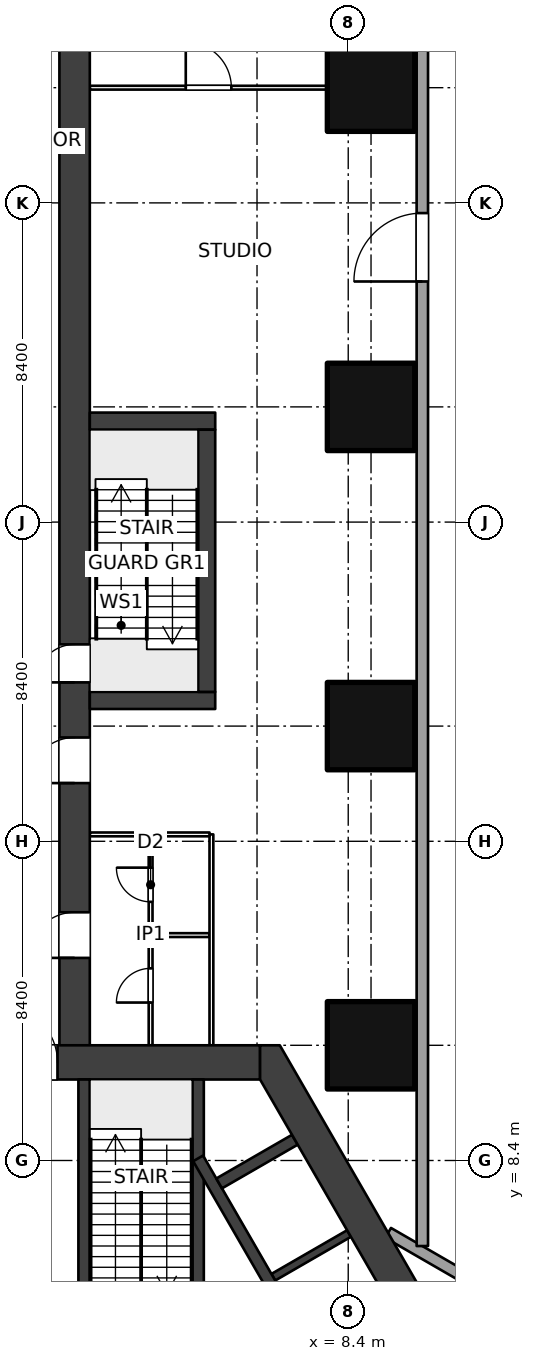
"""IFC4 building model, lengths in metres.
Left out: names, types, materials, properties, quantities, classifications, styles, units other than length and angle.
Written with IfcOpenShell. Run it as: python <this file> out.ifc"""

import sys

from ifc_helpers import new_model, si_unit, direction, frame, frame_2d, origin, origin_2d, place, context, subcontext, project, spatial, polyline, rectangle, outline, extrude, element, fill, save


model = new_model("IFC4")
c1 = context("Model", 3, precision=1e-05, world=origin(), true_north=direction((0.0, 1.0)))
c2 = subcontext(c1, "Body", "Model", "MODEL_VIEW")
j1 = project(units=[si_unit("LENGTHUNIT", "METRE"), si_unit("PLANEANGLEUNIT", "RADIAN")], contexts=[c1])
p1 = place(None, origin())
s1 = spatial("IfcSite", under=j1, at=p1, CompositionType="ELEMENT")
p2 = place(p1, origin())
s2 = spatial("IfcBuilding", under=s1, at=p2, CompositionType="ELEMENT")
p3 = place(p2, frame((0.0, 0.0, 6.0)))
s3 = spatial("IfcBuildingStorey", under=s2, at=p3, CompositionType="ELEMENT", Elevation=6.0)
for number, where, z_axis, x_axis in (
    (1, (9.0, 11.432, 0.0), (0.0, 0.0, 1.0), (1.0, 0.0, 0.0)),
    (2, (9.0, 19.832, 0.0), (0.0, 0.0, 1.0), (1.0, 0.0, 0.0)),
    (3, (9.0, 28.231, 0.0), (0.0, 0.0, 1.0), (1.0, 0.0, 0.0)),
    (4, (9.0, 36.632, 0.0), (0.0, 0.0, 1.0), (1.0, 0.0, 0.0)),
):
    element("IfcColumn", number, at=place(p3, frame(where, z_axis=z_axis, x_axis=x_axis)), inside=s3, PredefinedType="COLUMN", context=c2, shape_type="SweptSolid", body=[
        extrude(rectangle(XDim=2.3, YDim=2.3, at=origin_2d()), origin(), (0.0, 0.0, 1.0), 5.0),
    ])
p4 = place(p3, frame((-6.08, 10.981, 0.0), z_axis=(0.0, 0.0, 1.0), x_axis=(1.0, 0.0, 0.0)))
e5 = element("IfcWall", 5, at=p4, inside=s3, PredefinedType="SHEAR", context=c2, shape_type="SweptSolid", body=[
    extrude(rectangle(XDim=12.161, YDim=0.9, at=frame_2d((6.08, 0.0))), origin(), (0.0, 0.0, 1.0), 5.0),
])
p5 = place(p4, frame((5.33, 0.0, 0.0)))
e6 = element("IfcOpeningElement", 6, at=p5, cuts=e5, PredefinedType="OPENING", context=c2, shape_type="SweptSolid", body=[
    extrude(rectangle(XDim=1.5, YDim=2.1, at=frame_2d((0.75, 1.05))), frame((0.0, 0.46, 0.0), z_axis=(0.0, -1.0, 0.0), x_axis=(1.0, 0.0, 0.0)), (0.0, 0.0, 1.0), 0.92),
])
p6 = place(p3, origin())
e7 = element("IfcWall", 7, at=p6, inside=s3, PredefinedType="SHEAR", context=c2, shape_type="SweptSolid", body=[
    extrude(outline(polyline([(13.2, 0.0), (6.6, 11.432), (6.08, 11.432), (6.08, 10.531), (12.161, 0.0), (12.94, -0.45), (13.2, 0.0)])), origin(), (0.0, 0.0, 1.0), 5.0),
])
p7 = place(p3, frame((1.45, 3.63, 0.0), z_axis=(0.0, 0.0, 1.0), x_axis=(0.0, 1.0, 0.0)))
e8 = element("IfcWall", 8, at=p7, inside=s3, PredefinedType="SHEAR", context=c2, shape_type="SweptSolid", body=[
    extrude(rectangle(XDim=6.902, YDim=0.3, at=frame_2d((3.451, 0.0))), origin(), (0.0, 0.0, 1.0), 5.0),
])
p8 = place(p7, frame((0.25, 0.0, 0.0)))
e9 = element("IfcOpeningElement", 9, at=p8, cuts=e8, PredefinedType="OPENING", context=c2, shape_type="SweptSolid", body=[
    extrude(rectangle(XDim=1.0, YDim=2.1, at=frame_2d((0.5, 1.05))), frame((0.0, 0.16, 0.0), z_axis=(0.0, -1.0, 0.0), x_axis=(1.0, 0.0, 0.0)), (0.0, 0.0, 1.0), 0.32),
])
p9 = place(p3, frame((4.45, 3.63, 0.0), z_axis=(0.0, 0.0, 1.0), x_axis=(0.0, 1.0, 0.0)))
e10 = element("IfcWall", 10, at=p9, inside=s3, PredefinedType="SHEAR", context=c2, shape_type="SweptSolid", body=[
    extrude(rectangle(XDim=6.902, YDim=0.3, at=frame_2d((3.451, 0.0))), origin(), (0.0, 0.0, 1.0), 5.0),
])
p10 = place(p3, frame((4.45, 8.455, 0.0), z_axis=(0.0, 0.0, 1.0), x_axis=(0.500002290144, -0.866024081565, 0.0)))
e11 = element("IfcWall", 11, at=p10, inside=s3, PredefinedType="SHEAR", context=c2, shape_type="SweptSolid", body=[
    extrude(rectangle(XDim=10.195, YDim=0.3, at=frame_2d((5.098, 0.0))), origin(), (0.0, 0.0, 1.0), 5.0),
])
p11 = place(p3, frame((5.004, 7.796, 0.0), z_axis=(0.0, 0.0, 1.0), x_axis=(0.866053019151, 0.499952165731, 0.0)))
e12 = element("IfcWall", 12, at=p11, inside=s3, PredefinedType="SHEAR", context=c2, shape_type="SweptSolid", body=[
    extrude(rectangle(XDim=2.3, YDim=0.3, at=frame_2d((1.15, 0.0))), origin(), (0.0, 0.0, 1.0), 5.0),
])
p12 = place(p3, frame((6.429, 5.328, 0.0), z_axis=(0.0, 0.0, 1.0), x_axis=(0.866007057882, 0.500031774688, 0.0)))
e13 = element("IfcWall", 13, at=p12, inside=s3, PredefinedType="SHEAR", context=c2, shape_type="SweptSolid", body=[
    extrude(rectangle(XDim=2.3, YDim=0.2, at=frame_2d((1.15, 0.0))), origin(), (0.0, 0.0, 1.0), 5.0),
])
p13 = place(p3, frame((1.2, 10.981, 0.0), z_axis=(0.0, 0.0, 1.0), x_axis=(0.0, 1.0, 0.0)))
e14 = element("IfcWall", 14, at=p13, inside=s3, PredefinedType="SHEAR", context=c2, shape_type="SweptSolid", body=[
    extrude(rectangle(XDim=36.75, YDim=0.8, at=frame_2d((18.375, 0.0))), origin(), (0.0, 0.0, 1.0), 5.0),
])
p14 = place(p13, frame((10.0, 0.0, 0.0)))
e15 = element("IfcOpeningElement", 15, at=p14, cuts=e14, PredefinedType="OPENING", context=c2, shape_type="SweptSolid", body=[
    extrude(rectangle(XDim=1.0, YDim=2.1, at=frame_2d((0.5, 1.05))), frame((0.0, 0.41, 0.0), z_axis=(0.0, -1.0, 0.0), x_axis=(1.0, 0.0, 0.0)), (0.0, 0.0, 1.0), 0.82),
])
p15 = place(p13, frame((2.75, 0.0, 0.0)))
e16 = element("IfcOpeningElement", 16, at=p15, cuts=e14, PredefinedType="OPENING", context=c2, shape_type="SweptSolid", body=[
    extrude(rectangle(XDim=1.2, YDim=2.1, at=frame_2d((0.6, 1.05))), frame((0.0, 0.41, 0.0), z_axis=(0.0, -1.0, 0.0), x_axis=(1.0, 0.0, 0.0)), (0.0, 0.0, 1.0), 0.82),
])
p16 = place(p13, frame((7.35, 0.0, 0.0)))
e17 = element("IfcOpeningElement", 17, at=p16, cuts=e14, PredefinedType="OPENING", context=c2, shape_type="SweptSolid", body=[
    extrude(rectangle(XDim=1.2, YDim=2.1, at=frame_2d((0.6, 1.05))), frame((0.0, 0.41, 0.0), z_axis=(0.0, -1.0, 0.0), x_axis=(1.0, 0.0, 0.0)), (0.0, 0.0, 1.0), 0.82),
])
p17 = place(p3, frame((3.2, 11.432, 0.0), z_axis=(0.0, 0.0, 1.0), x_axis=(0.0, 1.0, 0.0)))
e18 = element("IfcWall", 18, at=p17, inside=s3, PredefinedType="PARTITIONING", context=c2, shape_type="SweptSolid", body=[
    extrude(rectangle(XDim=5.6, YDim=0.1, at=frame_2d((2.8, 0.0))), origin(), (0.0, 0.0, 1.0), 4.7),
])
p18 = place(p17, frame((1.125, 0.0, 0.0)))
e19 = element("IfcOpeningElement", 19, at=p18, cuts=e18, PredefinedType="OPENING", context=c2, shape_type="SweptSolid", body=[
    extrude(rectangle(XDim=0.9, YDim=2.1, at=frame_2d((0.45, 1.05))), frame((0.0, 0.06, 0.0), z_axis=(0.0, -1.0, 0.0), x_axis=(1.0, 0.0, 0.0)), (0.0, 0.0, 1.0), 0.12),
])
p19 = place(p17, frame((3.775, 0.0, 0.0)))
e20 = element("IfcOpeningElement", 20, at=p19, cuts=e18, PredefinedType="OPENING", context=c2, shape_type="SweptSolid", body=[
    extrude(rectangle(XDim=0.9, YDim=2.1, at=frame_2d((0.45, 1.05))), frame((0.0, 0.06, 0.0), z_axis=(0.0, -1.0, 0.0), x_axis=(1.0, 0.0, 0.0)), (0.0, 0.0, 1.0), 0.12),
])
p20 = place(p3, frame((3.25, 14.332, 0.0), z_axis=(0.0, 0.0, 1.0), x_axis=(1.0, 0.0, 0.0)))
e21 = element("IfcWall", 21, at=p20, inside=s3, PredefinedType="PARTITIONING", context=c2, shape_type="SweptSolid", body=[
    extrude(rectangle(XDim=1.5, YDim=0.1, at=frame_2d((0.75, 0.0))), origin(), (0.0, 0.0, 1.0), 4.7),
])
p21 = place(p3, frame((4.8, 11.432, 0.0), z_axis=(0.0, 0.0, 1.0), x_axis=(0.0, 1.0, 0.0)))
e22 = element("IfcWall", 22, at=p21, inside=s3, PredefinedType="PARTITIONING", context=c2, shape_type="SweptSolid", body=[
    extrude(rectangle(XDim=5.55, YDim=0.1, at=frame_2d((2.775, 0.0))), origin(), (0.0, 0.0, 1.0), 4.7),
])
p22 = place(p3, frame((1.6, 16.981, 0.0), z_axis=(0.0, 0.0, 1.0), x_axis=(1.0, 0.0, 0.0)))
e23 = element("IfcWall", 23, at=p22, inside=s3, PredefinedType="PARTITIONING", context=c2, shape_type="SweptSolid", body=[
    extrude(rectangle(XDim=3.15, YDim=0.1, at=frame_2d((1.575, 0.0))), origin(), (0.0, 0.0, 1.0), 4.7),
])
p23 = place(p3, frame((1.6, 36.632, 0.0), z_axis=(0.0, 0.0, 1.0), x_axis=(1.0, 0.0, 0.0)))
e24 = element("IfcWall", 24, at=p23, inside=s3, PredefinedType="PARTITIONING", context=c2, shape_type="SweptSolid", body=[
    extrude(rectangle(XDim=6.25, YDim=0.1, at=frame_2d((3.125, 0.0))), origin(), (0.0, 0.0, 1.0), 2.9),
])
p24 = place(p23, frame((2.525, 0.0, 0.0)))
e25 = element("IfcOpeningElement", 25, at=p24, cuts=e24, PredefinedType="OPENING", context=c2, shape_type="SweptSolid", body=[
    extrude(rectangle(XDim=1.2, YDim=2.1, at=frame_2d((0.6, 1.05))), frame((0.0, 0.06, 0.0), z_axis=(0.0, -1.0, 0.0), x_axis=(1.0, 0.0, 0.0)), (0.0, 0.0, 1.0), 0.12),
])
p25 = place(p3, frame((10.35, 6.149, 0.0), z_axis=(0.0, 0.0, 1.0), x_axis=(0.0, 1.0, 0.0)))
e26 = element("IfcWall", 26, at=p25, inside=s3, PredefinedType="SOLIDWALL", context=c2, shape_type="SweptSolid", body=[
    extrude(rectangle(XDim=41.883, YDim=0.3, at=frame_2d((20.941, 0.0))), origin(), (0.0, 0.0, 1.0), 4.7),
])
p26 = place(p25, frame((25.383, 0.0, 0.0)))
e27 = element("IfcOpeningElement", 27, at=p26, cuts=e26, PredefinedType="OPENING", context=c2, shape_type="SweptSolid", body=[
    extrude(rectangle(XDim=1.8, YDim=2.4, at=frame_2d((0.9, 1.2))), frame((0.0, 0.16, 0.0), z_axis=(0.0, -1.0, 0.0), x_axis=(1.0, 0.0, 0.0)), (0.0, 0.0, 1.0), 0.32),
])
p27 = place(p3, frame((9.45, 6.495, 0.0), z_axis=(0.0, 0.0, 1.0), x_axis=(0.866025301493, -0.500000177174, 0.0)))
e28 = element("IfcWall", 28, at=p27, inside=s3, PredefinedType="SOLIDWALL", context=c2, shape_type="SweptSolid", body=[
    extrude(rectangle(XDim=43.095, YDim=0.3, at=frame_2d((21.548, 0.0))), origin(), (0.0, 0.0, 1.0), 4.7),
])
p28 = place(p27, frame((26.595, 0.0, 0.0)))
e29 = element("IfcOpeningElement", 29, at=p28, cuts=e28, PredefinedType="OPENING", context=c2, shape_type="SweptSolid", body=[
    extrude(rectangle(XDim=1.8, YDim=2.4, at=frame_2d((0.9, 1.2))), frame((0.0, 0.16, 0.0), z_axis=(0.0, -1.0, 0.0), x_axis=(1.0, 0.0, 0.0)), (0.0, 0.0, 1.0), 0.32),
])
for number, where, z_axis, x_axis in (
    (30, (1.6, 20.507, 0.0), (0.0, 0.0, 1.0), (1.0, 0.0, 0.0)),
    (31, (1.6, 27.856, 0.0), (0.0, 0.0, 1.0), (1.0, 0.0, 0.0)),
):
    element("IfcWall", number, at=place(p3, frame(where, z_axis=z_axis, x_axis=x_axis)), inside=s3, PredefinedType="SOLIDWALL", context=c2, shape_type="SweptSolid", body=[
        extrude(rectangle(XDim=3.3, YDim=0.45, at=frame_2d((1.65, 0.0))), origin(), (0.0, 0.0, 1.0), 5.0),
    ])
p29 = place(p3, frame((4.675, 20.731, 0.0), z_axis=(0.0, 0.0, 1.0), x_axis=(0.0, 1.0, 0.0)))
e32 = element("IfcWall", 32, at=p29, inside=s3, PredefinedType="SOLIDWALL", context=c2, shape_type="SweptSolid", body=[
    extrude(rectangle(XDim=6.9, YDim=0.45, at=frame_2d((3.45, 0.0))), origin(), (0.0, 0.0, 1.0), 5.0),
])
p30 = place(p5, origin())
e33 = element("IfcDoor", 33, at=p30, inside=s3, OperationType="DOUBLE_DOOR_DOUBLE_SWING", PredefinedType="DOOR", context=c2, shape_type="SweptSolid", body=[
    extrude(rectangle(XDim=1.5, YDim=2.1, at=frame_2d((0.75, 1.05))), frame((0.0, 0.025, 0.0), z_axis=(0.0, -1.0, 0.0), x_axis=(1.0, 0.0, 0.0)), (0.0, 0.0, 1.0), 0.05),
])
fill(e6, e33)
p31 = place(p14, origin())
e34 = element("IfcDoor", 34, at=p31, inside=s3, OperationType="SINGLE_SWING_LEFT", PredefinedType="DOOR", context=c2, shape_type="SweptSolid", body=[
    extrude(rectangle(XDim=1.0, YDim=2.1, at=frame_2d((0.5, 1.05))), frame((0.0, 0.025, 0.0), z_axis=(0.0, -1.0, 0.0), x_axis=(1.0, 0.0, 0.0)), (0.0, 0.0, 1.0), 0.05),
])
fill(e15, e34)
p32 = place(p18, origin())
e35 = element("IfcDoor", 35, at=p32, inside=s3, OperationType="SINGLE_SWING_LEFT", PredefinedType="DOOR", context=c2, shape_type="SweptSolid", body=[
    extrude(rectangle(XDim=0.9, YDim=2.1, at=frame_2d((0.45, 1.05))), frame((0.0, 0.025, 0.0), z_axis=(0.0, -1.0, 0.0), x_axis=(1.0, 0.0, 0.0)), (0.0, 0.0, 1.0), 0.05),
])
fill(e19, e35)
p33 = place(p19, origin())
e36 = element("IfcDoor", 36, at=p33, inside=s3, OperationType="SINGLE_SWING_RIGHT", PredefinedType="DOOR", context=c2, shape_type="SweptSolid", body=[
    extrude(rectangle(XDim=0.9, YDim=2.1, at=frame_2d((0.45, 1.05))), frame((0.0, 0.025, 0.0), z_axis=(0.0, -1.0, 0.0), x_axis=(1.0, 0.0, 0.0)), (0.0, 0.0, 1.0), 0.05),
])
fill(e20, e36)
p34 = place(p15, origin())
e37 = element("IfcDoor", 37, at=p34, inside=s3, OperationType="DOUBLE_SWING_LEFT", PredefinedType="DOOR", context=c2, shape_type="SweptSolid", body=[
    extrude(rectangle(XDim=1.2, YDim=2.1, at=frame_2d((0.6, 1.05))), frame((0.0, 0.025, 0.0), z_axis=(0.0, -1.0, 0.0), x_axis=(1.0, 0.0, 0.0)), (0.0, 0.0, 1.0), 0.05),
])
fill(e16, e37)
p35 = place(p24, origin())
e38 = element("IfcDoor", 38, at=p35, inside=s3, OperationType="DOUBLE_SWING_LEFT", PredefinedType="DOOR", context=c2, shape_type="SweptSolid", body=[
    extrude(rectangle(XDim=1.2, YDim=2.1, at=frame_2d((0.6, 1.05))), frame((0.0, 0.025, 0.0), z_axis=(0.0, -1.0, 0.0), x_axis=(1.0, 0.0, 0.0)), (0.0, 0.0, 1.0), 0.05),
])
fill(e25, e38)
p36 = place(p16, origin())
e39 = element("IfcDoor", 39, at=p36, inside=s3, OperationType="DOUBLE_SWING_LEFT", PredefinedType="DOOR", context=c2, shape_type="SweptSolid", body=[
    extrude(rectangle(XDim=1.2, YDim=2.1, at=frame_2d((0.6, 1.05))), frame((0.0, 0.025, 0.0), z_axis=(0.0, -1.0, 0.0), x_axis=(1.0, 0.0, 0.0)), (0.0, 0.0, 1.0), 0.05),
])
fill(e17, e39)
p37 = place(p26, origin())
e40 = element("IfcDoor", 40, at=p37, inside=s3, OperationType="DOUBLE_DOOR_DOUBLE_SWING", PredefinedType="DOOR", context=c2, shape_type="SweptSolid", body=[
    extrude(rectangle(XDim=1.8, YDim=2.4, at=frame_2d((0.9, 1.2))), frame((0.0, 0.025, 0.0), z_axis=(0.0, -1.0, 0.0), x_axis=(1.0, 0.0, 0.0)), (0.0, 0.0, 1.0), 0.05),
])
fill(e27, e40)
save(model, sys.argv[1])
